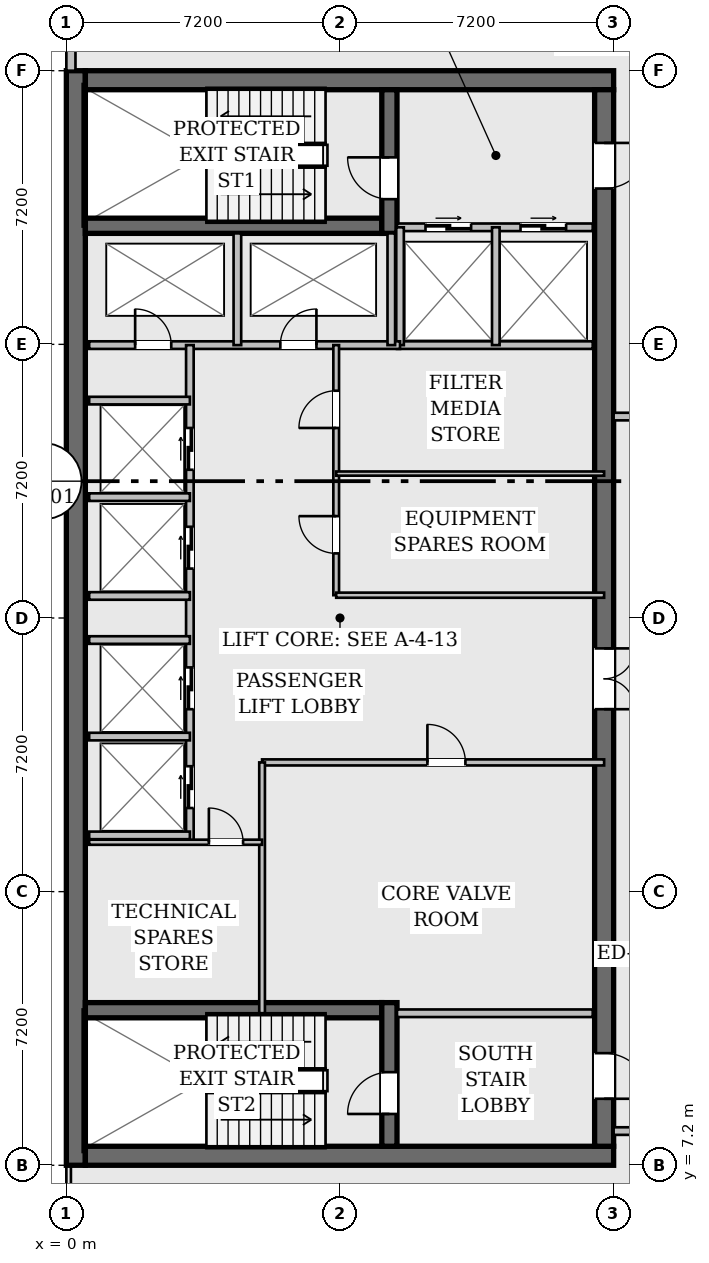
"""IFC4 building model, lengths in metres.
Left out: names, types, materials, properties, quantities, classifications, styles, units other than length and angle.
Written with IfcOpenShell. Run it as: python <this file> out.ifc"""

import sys

from ifc_helpers import new_model, si_unit, direction, frame, frame_2d, origin, place, context, subcontext, project, spatial, rectangle, extrude, element, fill, save


model = new_model("IFC4")
c1 = context("Model", 3, precision=1e-05, world=origin(), true_north=direction((0.0, 1.0)))
c2 = subcontext(c1, "Body", "Model", "MODEL_VIEW")
j1 = project(units=[si_unit("LENGTHUNIT", "METRE"), si_unit("PLANEANGLEUNIT", "RADIAN")], contexts=[c1])
p1 = place(None, origin())
s1 = spatial("IfcSite", under=j1, at=p1, CompositionType="ELEMENT")
p2 = place(p1, origin())
s2 = spatial("IfcBuilding", under=s1, at=p2, CompositionType="ELEMENT")
p3 = place(p2, frame((0.0, 0.0, 232.75)))
s3 = spatial("IfcBuildingStorey", under=s2, at=p3, CompositionType="ELEMENT", Elevation=232.75)
p4 = place(p3, frame((0.25, 7.2, 0.0), z_axis=(0.0, 0.0, 1.0), x_axis=(0.0, 1.0, 0.0)))
e1 = element("IfcWall", 1, at=p4, inside=s3, PredefinedType="SHEAR", context=c2, shape_type="SweptSolid", body=[
    extrude(rectangle(XDim=28.8, YDim=0.5, at=frame_2d((14.4, 0.0))), origin(), (0.0, 0.0, 1.0), 3.94),
])
for number, where, z_axis, x_axis in (
    (2, (0.5, 7.45, 0.0), (0.0, 0.0, 1.0), (1.0, 0.0, 0.0)),
    (3, (0.5, 35.75, 0.0), (0.0, 0.0, 1.0), (1.0, 0.0, 0.0)),
):
    element("IfcWall", number, at=place(p3, frame(where, z_axis=z_axis, x_axis=x_axis)), inside=s3, PredefinedType="SHEAR", context=c2, shape_type="SweptSolid", body=[
        extrude(rectangle(XDim=13.9, YDim=0.5, at=frame_2d((6.95, 0.0))), origin(), (0.0, 0.0, 1.0), 3.94),
    ])
p5 = place(p3, frame((14.15, 35.5, 0.0), z_axis=(0.0, 0.0, 1.0), x_axis=(0.0, -1.0, 0.0)))
e4 = element("IfcWall", 4, at=p5, inside=s3, PredefinedType="SHEAR", context=c2, shape_type="SweptSolid", body=[
    extrude(rectangle(XDim=27.8, YDim=0.5, at=frame_2d((13.9, 0.0))), origin(), (0.0, 0.0, 1.0), 3.94),
])
p6 = place(p5, frame((1.4, 0.0, 0.0)))
e5 = element("IfcOpeningElement", 5, at=p6, cuts=e4, PredefinedType="OPENING", context=c2, shape_type="SweptSolid", body=[
    extrude(rectangle(XDim=1.2, YDim=2.15, at=frame_2d((0.6, 1.075))), frame((0.0, 0.262, 0.0), z_axis=(0.0, -1.0, 0.0), x_axis=(1.0, 0.0, 0.0)), (0.0, 0.0, 1.0), 0.524),
])
p7 = place(p5, frame((25.35, 0.0, 0.0)))
e6 = element("IfcOpeningElement", 6, at=p7, cuts=e4, PredefinedType="OPENING", context=c2, shape_type="SweptSolid", body=[
    extrude(rectangle(XDim=1.2, YDim=2.15, at=frame_2d((0.6, 1.075))), frame((0.0, 0.262, 0.0), z_axis=(0.0, -1.0, 0.0), x_axis=(1.0, 0.0, 0.0)), (0.0, 0.0, 1.0), 0.524),
])
p8 = place(p5, frame((14.7, 0.0, 0.0)))
e7 = element("IfcOpeningElement", 7, at=p8, cuts=e4, PredefinedType="OPENING", context=c2, shape_type="SweptSolid", body=[
    extrude(rectangle(XDim=1.6, YDim=2.2, at=frame_2d((0.8, 1.1))), frame((0.0, 0.262, 0.0), z_axis=(0.0, -1.0, 0.0), x_axis=(1.0, 0.0, 0.0)), (0.0, 0.0, 1.0), 0.524),
])
for number, where, z_axis, x_axis in (
    (8, (0.5, 31.92, 0.0), (0.0, 0.0, 1.0), (1.0, 0.0, 0.0)),
    (9, (0.5, 11.28, 0.0), (0.0, 0.0, 1.0), (1.0, 0.0, 0.0)),
):
    element("IfcWall", number, at=place(p3, frame(where, z_axis=z_axis, x_axis=x_axis)), inside=s3, PredefinedType="SHEAR", context=c2, shape_type="SweptSolid", body=[
        extrude(rectangle(XDim=7.8, YDim=0.4, at=frame_2d((3.9, 0.0))), origin(), (0.0, 0.0, 1.0), 3.94),
    ])
p9 = place(p3, frame((8.5, 31.72, 0.0), z_axis=(0.0, 0.0, 1.0), x_axis=(0.0, 1.0, 0.0)))
e10 = element("IfcWall", 10, at=p9, inside=s3, PredefinedType="SHEAR", context=c2, shape_type="SweptSolid", body=[
    extrude(rectangle(XDim=3.78, YDim=0.4, at=frame_2d((1.89, 0.0))), origin(), (0.0, 0.0, 1.0), 3.94),
])
p10 = place(p9, frame((0.9, 0.0, 0.0)))
e11 = element("IfcOpeningElement", 11, at=p10, cuts=e10, PredefinedType="OPENING", context=c2, shape_type="SweptSolid", body=[
    extrude(rectangle(XDim=1.1, YDim=2.15, at=frame_2d((0.55, 1.075))), frame((0.0, 0.212, 0.0), z_axis=(0.0, -1.0, 0.0), x_axis=(1.0, 0.0, 0.0)), (0.0, 0.0, 1.0), 0.424),
])
p11 = place(p3, frame((8.5, 7.7, 0.0), z_axis=(0.0, 0.0, 1.0), x_axis=(0.0, 1.0, 0.0)))
e12 = element("IfcWall", 12, at=p11, inside=s3, PredefinedType="SHEAR", context=c2, shape_type="SweptSolid", body=[
    extrude(rectangle(XDim=3.78, YDim=0.4, at=frame_2d((1.89, 0.0))), origin(), (0.0, 0.0, 1.0), 3.94),
])
p12 = place(p11, frame((0.85, 0.0, 0.0)))
e13 = element("IfcOpeningElement", 13, at=p12, cuts=e12, PredefinedType="OPENING", context=c2, shape_type="SweptSolid", body=[
    extrude(rectangle(XDim=1.1, YDim=2.15, at=frame_2d((0.55, 1.075))), frame((0.0, 0.212, 0.0), z_axis=(0.0, -1.0, 0.0), x_axis=(1.0, 0.0, 0.0)), (0.0, 0.0, 1.0), 0.424),
])
p13 = place(p3, frame((0.12, 36.0, 0.0), z_axis=(0.0, 0.0, 1.0), x_axis=(0.0, 1.0, 0.0)))
e14 = element("IfcWall", 14, at=p13, inside=s3, PredefinedType="STANDARD", context=c2, shape_type="SweptSolid", body=[
    extrude(rectangle(XDim=1.23, YDim=0.24, at=frame_2d((0.615, 0.0))), origin(), (0.0, 0.0, 1.0), 3.94),
])
p14 = place(p3, frame((8.7, 31.88, 0.0), z_axis=(0.0, 0.0, 1.0), x_axis=(1.0, 0.0, 0.0)))
e15 = element("IfcWall", 15, at=p14, inside=s3, PredefinedType="PARTITIONING", context=c2, shape_type="SweptSolid", body=[
    extrude(rectangle(XDim=5.15, YDim=0.2, at=frame_2d((2.575, 0.0))), origin(), (0.0, 0.0, 1.0), 3.94),
])
p15 = place(p14, frame((0.75, 0.0, 0.0)))
e16 = element("IfcOpeningElement", 16, at=p15, cuts=e15, PredefinedType="OPENING", context=c2, shape_type="SweptSolid", body=[
    extrude(rectangle(XDim=1.2, YDim=2.2, at=frame_2d((0.6, 1.1))), frame((0.0, 0.112, 0.0), z_axis=(0.0, -1.0, 0.0), x_axis=(1.0, 0.0, 0.0)), (0.0, 0.0, 1.0), 0.224),
])
p16 = place(p14, frame((3.25, 0.0, 0.0)))
e17 = element("IfcOpeningElement", 17, at=p16, cuts=e15, PredefinedType="OPENING", context=c2, shape_type="SweptSolid", body=[
    extrude(rectangle(XDim=1.2, YDim=2.2, at=frame_2d((0.6, 1.1))), frame((0.0, 0.112, 0.0), z_axis=(0.0, -1.0, 0.0), x_axis=(1.0, 0.0, 0.0)), (0.0, 0.0, 1.0), 0.224),
])
for number, where, z_axis, x_axis in (
    (18, (8.7, 11.2, 0.0), (0.0, 0.0, 1.0), (1.0, 0.0, 0.0)),
    (19, (8.7, 28.78, 0.0), (0.0, 0.0, 1.0), (1.0, 0.0, 0.0)),
):
    element("IfcWall", number, at=place(p3, frame(where, z_axis=z_axis, x_axis=x_axis)), inside=s3, PredefinedType="PARTITIONING", context=c2, shape_type="SweptSolid", body=[
        extrude(rectangle(XDim=5.15, YDim=0.2, at=frame_2d((2.575, 0.0))), origin(), (0.0, 0.0, 1.0), 3.94),
    ])
for number, where, z_axis, x_axis in (
    (20, (8.78, 28.78, 0.0), (0.0, 0.0, 1.0), (0.0, 1.0, 0.0)),
    (21, (11.3, 28.78, 0.0), (0.0, 0.0, 1.0), (0.0, 1.0, 0.0)),
):
    element("IfcWall", number, at=place(p3, frame(where, z_axis=z_axis, x_axis=x_axis)), inside=s3, PredefinedType="PARTITIONING", context=c2, shape_type="SweptSolid", body=[
        extrude(rectangle(XDim=3.1, YDim=0.2, at=frame_2d((1.55, 0.0))), origin(), (0.0, 0.0, 1.0), 3.94),
    ])
p17 = place(p3, frame((0.6, 28.78, 0.0), z_axis=(0.0, 0.0, 1.0), x_axis=(1.0, 0.0, 0.0)))
e22 = element("IfcWall", 22, at=p17, inside=s3, PredefinedType="PARTITIONING", context=c2, shape_type="SweptSolid", body=[
    extrude(rectangle(XDim=8.18, YDim=0.2, at=frame_2d((4.09, 0.0))), origin(), (0.0, 0.0, 1.0), 3.94),
])
p18 = place(p17, frame((1.21, 0.0, 0.0)))
e23 = element("IfcOpeningElement", 23, at=p18, cuts=e22, PredefinedType="OPENING", context=c2, shape_type="SweptSolid", body=[
    extrude(rectangle(XDim=0.95, YDim=2.15, at=frame_2d((0.475, 1.075))), frame((0.0, 0.112, 0.0), z_axis=(0.0, -1.0, 0.0), x_axis=(1.0, 0.0, 0.0)), (0.0, 0.0, 1.0), 0.224),
])
p19 = place(p17, frame((5.03, 0.0, 0.0)))
e24 = element("IfcOpeningElement", 24, at=p19, cuts=e22, PredefinedType="OPENING", context=c2, shape_type="SweptSolid", body=[
    extrude(rectangle(XDim=0.95, YDim=2.15, at=frame_2d((0.475, 1.075))), frame((0.0, 0.112, 0.0), z_axis=(0.0, -1.0, 0.0), x_axis=(1.0, 0.0, 0.0)), (0.0, 0.0, 1.0), 0.224),
])
for number, where, z_axis, x_axis in (
    (25, (4.5, 28.78, 0.0), (0.0, 0.0, 1.0), (0.0, 1.0, 0.0)),
    (26, (8.55, 28.78, 0.0), (0.0, 0.0, 1.0), (0.0, 1.0, 0.0)),
):
    element("IfcWall", number, at=place(p3, frame(where, z_axis=z_axis, x_axis=x_axis)), inside=s3, PredefinedType="PARTITIONING", context=c2, shape_type="SweptSolid", body=[
        extrude(rectangle(XDim=2.94, YDim=0.2, at=frame_2d((1.47, 0.0))), origin(), (0.0, 0.0, 1.0), 3.94),
    ])
p20 = place(p3, frame((3.25, 15.7, 0.0), z_axis=(0.0, 0.0, 1.0), x_axis=(0.0, 1.0, 0.0)))
e27 = element("IfcWall", 27, at=p20, inside=s3, PredefinedType="PARTITIONING", context=c2, shape_type="SweptSolid", body=[
    extrude(rectangle(XDim=13.08, YDim=0.2, at=frame_2d((6.54, 0.0))), origin(), (0.0, 0.0, 1.0), 3.94),
])
p21 = place(p20, frame((0.9, 0.0, 0.0)))
e28 = element("IfcOpeningElement", 28, at=p21, cuts=e27, PredefinedType="OPENING", context=c2, shape_type="SweptSolid", body=[
    extrude(rectangle(XDim=1.1, YDim=2.2, at=frame_2d((0.55, 1.1))), frame((0.0, 0.112, 0.0), z_axis=(0.0, -1.0, 0.0), x_axis=(1.0, 0.0, 0.0)), (0.0, 0.0, 1.0), 0.224),
])
p22 = place(p20, frame((3.5, 0.0, 0.0)))
e29 = element("IfcOpeningElement", 29, at=p22, cuts=e27, PredefinedType="OPENING", context=c2, shape_type="SweptSolid", body=[
    extrude(rectangle(XDim=1.1, YDim=2.2, at=frame_2d((0.55, 1.1))), frame((0.0, 0.112, 0.0), z_axis=(0.0, -1.0, 0.0), x_axis=(1.0, 0.0, 0.0)), (0.0, 0.0, 1.0), 0.224),
])
p23 = place(p20, frame((7.2, 0.0, 0.0)))
e30 = element("IfcOpeningElement", 30, at=p23, cuts=e27, PredefinedType="OPENING", context=c2, shape_type="SweptSolid", body=[
    extrude(rectangle(XDim=1.1, YDim=2.2, at=frame_2d((0.55, 1.1))), frame((0.0, 0.112, 0.0), z_axis=(0.0, -1.0, 0.0), x_axis=(1.0, 0.0, 0.0)), (0.0, 0.0, 1.0), 0.224),
])
p24 = place(p20, frame((9.8, 0.0, 0.0)))
e31 = element("IfcOpeningElement", 31, at=p24, cuts=e27, PredefinedType="OPENING", context=c2, shape_type="SweptSolid", body=[
    extrude(rectangle(XDim=1.1, YDim=2.2, at=frame_2d((0.55, 1.1))), frame((0.0, 0.112, 0.0), z_axis=(0.0, -1.0, 0.0), x_axis=(1.0, 0.0, 0.0)), (0.0, 0.0, 1.0), 0.224),
])
for number, where, z_axis, x_axis in (
    (32, (0.6, 15.88, 0.0), (0.0, 0.0, 1.0), (1.0, 0.0, 0.0)),
    (33, (0.6, 18.48, 0.0), (0.0, 0.0, 1.0), (1.0, 0.0, 0.0)),
    (34, (0.6, 22.18, 0.0), (0.0, 0.0, 1.0), (1.0, 0.0, 0.0)),
    (35, (0.6, 24.78, 0.0), (0.0, 0.0, 1.0), (1.0, 0.0, 0.0)),
    (36, (0.6, 21.02, 0.0), (0.0, 0.0, 1.0), (1.0, 0.0, 0.0)),
    (37, (0.6, 27.32, 0.0), (0.0, 0.0, 1.0), (1.0, 0.0, 0.0)),
):
    element("IfcWall", number, at=place(p3, frame(where, z_axis=z_axis, x_axis=x_axis)), inside=s3, PredefinedType="PARTITIONING", context=c2, shape_type="SweptSolid", body=[
        extrude(rectangle(XDim=2.65, YDim=0.2, at=frame_2d((1.325, 0.0))), origin(), (0.0, 0.0, 1.0), 3.94),
    ])
p25 = place(p3, frame((7.1, 22.2, 0.0), z_axis=(0.0, 0.0, 1.0), x_axis=(0.0, 1.0, 0.0)))
e38 = element("IfcWall", 38, at=p25, inside=s3, PredefinedType="PARTITIONING", context=c2, shape_type="SweptSolid", body=[
    extrude(rectangle(XDim=6.58, YDim=0.15, at=frame_2d((3.29, 0.0))), origin(), (0.0, 0.0, 1.0), 3.94),
])
p26 = place(p25, frame((1.1, 0.0, 0.0)))
e39 = element("IfcOpeningElement", 39, at=p26, cuts=e38, PredefinedType="OPENING", context=c2, shape_type="SweptSolid", body=[
    extrude(rectangle(XDim=0.98, YDim=2.15, at=frame_2d((0.49, 1.075))), frame((0.0, 0.087, 0.0), z_axis=(0.0, -1.0, 0.0), x_axis=(1.0, 0.0, 0.0)), (0.0, 0.0, 1.0), 0.174),
])
p27 = place(p25, frame((4.4, 0.0, 0.0)))
e40 = element("IfcOpeningElement", 40, at=p27, cuts=e38, PredefinedType="OPENING", context=c2, shape_type="SweptSolid", body=[
    extrude(rectangle(XDim=0.98, YDim=2.15, at=frame_2d((0.49, 1.075))), frame((0.0, 0.087, 0.0), z_axis=(0.0, -1.0, 0.0), x_axis=(1.0, 0.0, 0.0)), (0.0, 0.0, 1.0), 0.174),
])
p28 = place(p3, frame((7.1, 22.2, 0.0), z_axis=(0.0, 0.0, 1.0), x_axis=(1.0, 0.0, 0.0)))
e41 = element("IfcWall", 41, at=p28, inside=s3, PredefinedType="PARTITIONING", context=c2, shape_type="SweptSolid", body=[
    extrude(rectangle(XDim=7.05, YDim=0.135, at=frame_2d((3.525, 0.0))), origin(), (0.0, 0.0, 1.0), 3.94),
])
p29 = place(p3, frame((7.1, 25.4, 0.0), z_axis=(0.0, 0.0, 1.0), x_axis=(1.0, 0.0, 0.0)))
e42 = element("IfcWall", 42, at=p29, inside=s3, PredefinedType="PARTITIONING", context=c2, shape_type="SweptSolid", body=[
    extrude(rectangle(XDim=7.05, YDim=0.11, at=frame_2d((3.525, 0.0))), origin(), (0.0, 0.0, 1.0), 3.94),
])
p30 = place(p3, frame((5.15, 17.8, 0.0), z_axis=(0.0, 0.0, 1.0), x_axis=(1.0, 0.0, 0.0)))
e43 = element("IfcWall", 43, at=p30, inside=s3, PredefinedType="PARTITIONING", context=c2, shape_type="SweptSolid", body=[
    extrude(rectangle(XDim=9.0, YDim=0.16, at=frame_2d((4.5, 0.0))), origin(), (0.0, 0.0, 1.0), 3.94),
])
p31 = place(p30, frame((4.35, 0.0, 0.0)))
e44 = element("IfcOpeningElement", 44, at=p31, cuts=e43, PredefinedType="OPENING", context=c2, shape_type="SweptSolid", body=[
    extrude(rectangle(XDim=1.0, YDim=2.15, at=frame_2d((0.5, 1.075))), frame((0.0, 0.092, 0.0), z_axis=(0.0, -1.0, 0.0), x_axis=(1.0, 0.0, 0.0)), (0.0, 0.0, 1.0), 0.184),
])
p32 = place(p3, frame((5.15, 11.2, 0.0), z_axis=(0.0, 0.0, 1.0), x_axis=(0.0, 1.0, 0.0)))
e45 = element("IfcWall", 45, at=p32, inside=s3, PredefinedType="PARTITIONING", context=c2, shape_type="SweptSolid", body=[
    extrude(rectangle(XDim=6.6, YDim=0.15, at=frame_2d((3.3, 0.0))), origin(), (0.0, 0.0, 1.0), 3.94),
])
p33 = place(p3, frame((0.6, 15.7, 0.0), z_axis=(0.0, 0.0, 1.0), x_axis=(1.0, 0.0, 0.0)))
e46 = element("IfcWall", 46, at=p33, inside=s3, PredefinedType="PARTITIONING", context=c2, shape_type="SweptSolid", body=[
    extrude(rectangle(XDim=4.55, YDim=0.135, at=frame_2d((2.275, 0.0))), origin(), (0.0, 0.0, 1.0), 3.94),
])
p34 = place(p33, frame((3.15, 0.0, 0.0)))
e47 = element("IfcOpeningElement", 47, at=p34, cuts=e46, PredefinedType="OPENING", context=c2, shape_type="SweptSolid", body=[
    extrude(rectangle(XDim=0.9, YDim=2.15, at=frame_2d((0.45, 1.075))), frame((0.0, 0.08, 0.0), z_axis=(0.0, -1.0, 0.0), x_axis=(1.0, 0.0, 0.0)), (0.0, 0.0, 1.0), 0.159),
])
p35 = place(p3, frame((14.4, 26.9, 0.0), z_axis=(0.0, 0.0, 1.0), x_axis=(1.0, 0.0, 0.0)))
e48 = element("IfcWall", 48, at=p35, inside=s3, PredefinedType="PARTITIONING", context=c2, shape_type="SweptSolid", body=[
    extrude(rectangle(XDim=2.95, YDim=0.2, at=frame_2d((1.475, 0.0))), origin(), (0.0, 0.0, 1.0), 3.508),
])
p36 = place(p35, frame((0.95, 0.0, 0.0)))
e49 = element("IfcOpeningElement", 49, at=p36, cuts=e48, PredefinedType="OPENING", context=c2, shape_type="SweptSolid", body=[
    extrude(rectangle(XDim=1.1, YDim=2.15, at=frame_2d((0.55, 1.075))), frame((0.0, 0.112, 0.0), z_axis=(0.0, -1.0, 0.0), x_axis=(1.0, 0.0, 0.0)), (0.0, 0.0, 1.0), 0.224),
])
p37 = place(p3, frame((14.4, 8.1, 0.0), z_axis=(0.0, 0.0, 1.0), x_axis=(1.0, 0.0, 0.0)))
e50 = element("IfcWall", 50, at=p37, inside=s3, PredefinedType="PARTITIONING", context=c2, shape_type="SweptSolid", body=[
    extrude(rectangle(XDim=2.95, YDim=0.2, at=frame_2d((1.475, 0.0))), origin(), (0.0, 0.0, 1.0), 3.94),
])
p38 = place(p10, origin())
e51 = element("IfcDoor", 51, at=p38, inside=s3, OperationType="SINGLE_SWING_RIGHT", PredefinedType="DOOR", context=c2, shape_type="SweptSolid", body=[
    extrude(rectangle(XDim=1.1, YDim=2.15, at=frame_2d((0.55, 1.075))), frame((0.0, 0.025, 0.0), z_axis=(0.0, -1.0, 0.0), x_axis=(1.0, 0.0, 0.0)), (0.0, 0.0, 1.0), 0.05),
])
fill(e11, e51)
p39 = place(p6, origin())
e52 = element("IfcDoor", 52, at=p39, inside=s3, OperationType="SINGLE_SWING_LEFT", PredefinedType="DOOR", context=c2, shape_type="SweptSolid", body=[
    extrude(rectangle(XDim=1.2, YDim=2.15, at=frame_2d((0.6, 1.075))), frame((0.0, 0.025, 0.0), z_axis=(0.0, -1.0, 0.0), x_axis=(1.0, 0.0, 0.0)), (0.0, 0.0, 1.0), 0.05),
])
fill(e5, e52)
p40 = place(p12, origin())
e53 = element("IfcDoor", 53, at=p40, inside=s3, OperationType="SINGLE_SWING_LEFT", PredefinedType="DOOR", context=c2, shape_type="SweptSolid", body=[
    extrude(rectangle(XDim=1.1, YDim=2.15, at=frame_2d((0.55, 1.075))), frame((0.0, 0.025, 0.0), z_axis=(0.0, -1.0, 0.0), x_axis=(1.0, 0.0, 0.0)), (0.0, 0.0, 1.0), 0.05),
])
fill(e13, e53)
p41 = place(p7, origin())
e54 = element("IfcDoor", 54, at=p41, inside=s3, OperationType="SINGLE_SWING_RIGHT", PredefinedType="DOOR", context=c2, shape_type="SweptSolid", body=[
    extrude(rectangle(XDim=1.2, YDim=2.15, at=frame_2d((0.6, 1.075))), frame((0.0, 0.025, 0.0), z_axis=(0.0, -1.0, 0.0), x_axis=(1.0, 0.0, 0.0)), (0.0, 0.0, 1.0), 0.05),
])
fill(e6, e54)
p42 = place(p15, origin())
e55 = element("IfcDoor", 55, at=p42, inside=s3, OperationType="DOUBLE_DOOR_SLIDING", PredefinedType="DOOR", context=c2, shape_type="SweptSolid", body=[
    extrude(rectangle(XDim=1.2, YDim=2.2, at=frame_2d((0.6, 1.1))), frame((0.0, 0.025, 0.0), z_axis=(0.0, -1.0, 0.0), x_axis=(1.0, 0.0, 0.0)), (0.0, 0.0, 1.0), 0.05),
])
fill(e16, e55)
p43 = place(p16, origin())
e56 = element("IfcDoor", 56, at=p43, inside=s3, OperationType="DOUBLE_DOOR_SLIDING", PredefinedType="DOOR", context=c2, shape_type="SweptSolid", body=[
    extrude(rectangle(XDim=1.2, YDim=2.2, at=frame_2d((0.6, 1.1))), frame((0.0, 0.025, 0.0), z_axis=(0.0, -1.0, 0.0), x_axis=(1.0, 0.0, 0.0)), (0.0, 0.0, 1.0), 0.05),
])
fill(e17, e56)
p44 = place(p18, origin())
e57 = element("IfcDoor", 57, at=p44, inside=s3, OperationType="SINGLE_SWING_LEFT", PredefinedType="DOOR", context=c2, shape_type="SweptSolid", body=[
    extrude(rectangle(XDim=0.95, YDim=2.15, at=frame_2d((0.475, 1.075))), frame((0.0, 0.025, 0.0), z_axis=(0.0, -1.0, 0.0), x_axis=(1.0, 0.0, 0.0)), (0.0, 0.0, 1.0), 0.05),
])
fill(e23, e57)
p45 = place(p19, origin())
e58 = element("IfcDoor", 58, at=p45, inside=s3, OperationType="SINGLE_SWING_RIGHT", PredefinedType="DOOR", context=c2, shape_type="SweptSolid", body=[
    extrude(rectangle(XDim=0.95, YDim=2.15, at=frame_2d((0.475, 1.075))), frame((0.0, 0.025, 0.0), z_axis=(0.0, -1.0, 0.0), x_axis=(1.0, 0.0, 0.0)), (0.0, 0.0, 1.0), 0.05),
])
fill(e24, e58)
p46 = place(p8, origin())
e59 = element("IfcDoor", 59, at=p46, inside=s3, OperationType="DOUBLE_DOOR_SINGLE_SWING", PredefinedType="DOOR", context=c2, shape_type="SweptSolid", body=[
    extrude(rectangle(XDim=1.6, YDim=2.2, at=frame_2d((0.8, 1.1))), frame((0.0, 0.025, 0.0), z_axis=(0.0, -1.0, 0.0), x_axis=(1.0, 0.0, 0.0)), (0.0, 0.0, 1.0), 0.05),
])
fill(e7, e59)
p47 = place(p21, origin())
e60 = element("IfcDoor", 60, at=p47, inside=s3, OperationType="DOUBLE_DOOR_SLIDING", PredefinedType="DOOR", context=c2, shape_type="SweptSolid", body=[
    extrude(rectangle(XDim=1.1, YDim=2.2, at=frame_2d((0.55, 1.1))), frame((0.0, 0.025, 0.0), z_axis=(0.0, -1.0, 0.0), x_axis=(1.0, 0.0, 0.0)), (0.0, 0.0, 1.0), 0.05),
])
fill(e28, e60)
p48 = place(p22, origin())
e61 = element("IfcDoor", 61, at=p48, inside=s3, OperationType="DOUBLE_DOOR_SLIDING", PredefinedType="DOOR", context=c2, shape_type="SweptSolid", body=[
    extrude(rectangle(XDim=1.1, YDim=2.2, at=frame_2d((0.55, 1.1))), frame((0.0, 0.025, 0.0), z_axis=(0.0, -1.0, 0.0), x_axis=(1.0, 0.0, 0.0)), (0.0, 0.0, 1.0), 0.05),
])
fill(e29, e61)
p49 = place(p23, origin())
e62 = element("IfcDoor", 62, at=p49, inside=s3, OperationType="DOUBLE_DOOR_SLIDING", PredefinedType="DOOR", context=c2, shape_type="SweptSolid", body=[
    extrude(rectangle(XDim=1.1, YDim=2.2, at=frame_2d((0.55, 1.1))), frame((0.0, 0.025, 0.0), z_axis=(0.0, -1.0, 0.0), x_axis=(1.0, 0.0, 0.0)), (0.0, 0.0, 1.0), 0.05),
])
fill(e30, e62)
p50 = place(p24, origin())
e63 = element("IfcDoor", 63, at=p50, inside=s3, OperationType="DOUBLE_DOOR_SLIDING", PredefinedType="DOOR", context=c2, shape_type="SweptSolid", body=[
    extrude(rectangle(XDim=1.1, YDim=2.2, at=frame_2d((0.55, 1.1))), frame((0.0, 0.025, 0.0), z_axis=(0.0, -1.0, 0.0), x_axis=(1.0, 0.0, 0.0)), (0.0, 0.0, 1.0), 0.05),
])
fill(e31, e63)
p51 = place(p26, origin())
e64 = element("IfcDoor", 64, at=p51, inside=s3, OperationType="SINGLE_SWING_RIGHT", PredefinedType="DOOR", context=c2, shape_type="SweptSolid", body=[
    extrude(rectangle(XDim=0.98, YDim=2.15, at=frame_2d((0.49, 1.075))), frame((0.0, 0.025, 0.0), z_axis=(0.0, -1.0, 0.0), x_axis=(1.0, 0.0, 0.0)), (0.0, 0.0, 1.0), 0.05),
])
fill(e39, e64)
p52 = place(p27, origin())
e65 = element("IfcDoor", 65, at=p52, inside=s3, OperationType="SINGLE_SWING_LEFT", PredefinedType="DOOR", context=c2, shape_type="SweptSolid", body=[
    extrude(rectangle(XDim=0.98, YDim=2.15, at=frame_2d((0.49, 1.075))), frame((0.0, 0.025, 0.0), z_axis=(0.0, -1.0, 0.0), x_axis=(1.0, 0.0, 0.0)), (0.0, 0.0, 1.0), 0.05),
])
fill(e40, e65)
p53 = place(p31, origin())
e66 = element("IfcDoor", 66, at=p53, inside=s3, OperationType="SINGLE_SWING_LEFT", PredefinedType="DOOR", context=c2, shape_type="SweptSolid", body=[
    extrude(rectangle(XDim=1.0, YDim=2.15, at=frame_2d((0.5, 1.075))), frame((0.0, 0.025, 0.0), z_axis=(0.0, -1.0, 0.0), x_axis=(1.0, 0.0, 0.0)), (0.0, 0.0, 1.0), 0.05),
])
fill(e44, e66)
p54 = place(p34, origin())
e67 = element("IfcDoor", 67, at=p54, inside=s3, OperationType="SINGLE_SWING_LEFT", PredefinedType="DOOR", context=c2, shape_type="SweptSolid", body=[
    extrude(rectangle(XDim=0.9, YDim=2.15, at=frame_2d((0.45, 1.075))), frame((0.0, 0.025, 0.0), z_axis=(0.0, -1.0, 0.0), x_axis=(1.0, 0.0, 0.0)), (0.0, 0.0, 1.0), 0.05),
])
fill(e47, e67)
save(model, sys.argv[1])
